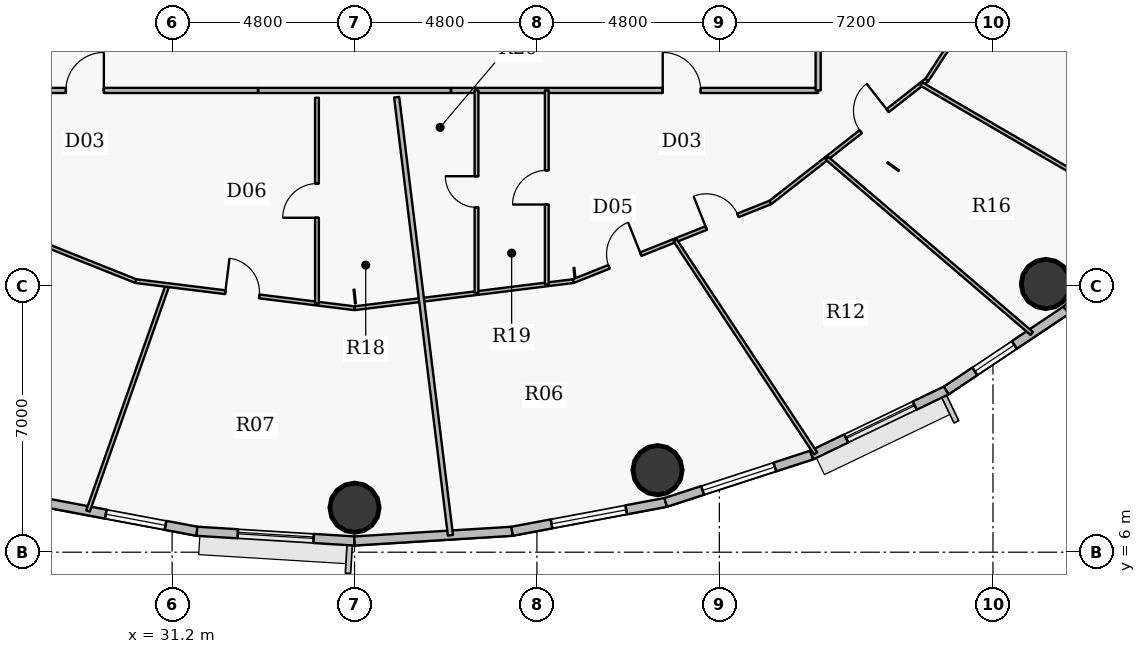
"""IFC4 building model, lengths in metres.
Left out: names, types, materials, properties, quantities, classifications, styles, units other than length and angle.
Written with IfcOpenShell. Run it as: python <this file> out.ifc"""

import sys

from ifc_helpers import new_model, si_unit, direction, frame, frame_2d, origin, origin_2d, place, context, subcontext, project, spatial, rectangle, hollow_circle, extrude, source, transform, mapped, element, fill, save


model = new_model("IFC4")
c1 = context("Model", 3, precision=1e-05, world=origin(), true_north=direction((0.0, 1.0)))
c2 = subcontext(c1, "Body", "Model", "MODEL_VIEW")
j1 = project(units=[si_unit("LENGTHUNIT", "METRE"), si_unit("PLANEANGLEUNIT", "RADIAN")], contexts=[c1])
p1 = place(None, origin())
s1 = spatial("IfcSite", under=j1, at=p1, CompositionType="ELEMENT")
p2 = place(p1, origin())
s2 = spatial("IfcBuilding", under=s1, at=p2, CompositionType="ELEMENT")
p3 = place(p2, frame((0.0, 0.0, 171.15)))
s3 = spatial("IfcBuildingStorey", under=s2, at=p3, CompositionType="ELEMENT", Elevation=171.15)
for number, where, z_axis, x_axis in (
    (1, (36.0, 7.17, 0.0), (0.0, 0.0, 1.0), (1.0, 0.0, 0.0)),
    (2, (43.973, 8.159, 0.0), (0.0, 0.0, 1.0), (1.0, 0.0, 0.0)),
    (3, (54.192, 13.058, 0.0), (0.0, 0.0, 1.0), (1.0, 0.0, 0.0)),
):
    element("IfcColumn", number, at=place(p3, frame(where, z_axis=z_axis, x_axis=x_axis)), inside=s3, PredefinedType="COLUMN", context=c2, shape_type="SweptSolid", body=[
        extrude(hollow_circle(Radius=0.65, WallThickness=0.04, at=origin_2d()), origin(), (0.0, 0.0, 1.0), 3.75),
    ])
p4 = place(p3, frame((31.854, 6.551, 0.0), z_axis=(0.0, 0.0, 1.0), x_axis=(-0.982788108205, 0.184736391573, 0.0)))
e4 = element("IfcWall", 4, at=p4, inside=s3, PredefinedType="SOLIDWALL", context=c2, shape_type="SweptSolid", body=[
    extrude(rectangle(XDim=4.114, YDim=0.24, at=frame_2d((2.057, 0.0))), origin(), (0.0, 0.0, 1.0), 3.5),
])
p5 = place(p4, frame((0.842, 0.0, 0.9)))
e5 = element("IfcOpeningElement", 5, at=p5, cuts=e4, PredefinedType="OPENING", context=c2, shape_type="SweptSolid", body=[
    extrude(rectangle(XDim=1.6, YDim=1.75, at=origin_2d()), frame((0.8, 0.13, 0.875), z_axis=(0.0, -1.0, 0.0), x_axis=(1.0, 0.0, 0.0)), (0.0, 0.0, 1.0), 0.26),
])
p6 = place(p3, frame((36.0, 6.295, 0.0), z_axis=(0.0, 0.0, 1.0), x_axis=(-0.998104600619, 0.061540281305, 0.0)))
e6 = element("IfcWall", 6, at=p6, inside=s3, PredefinedType="SOLIDWALL", context=c2, shape_type="SweptSolid", body=[
    extrude(rectangle(XDim=4.154, YDim=0.24, at=frame_2d((2.077, 0.0))), origin(), (0.0, 0.0, 1.0), 3.5),
])
p7 = place(p6, frame((1.077, 0.0, 0.9)))
e7 = element("IfcOpeningElement", 7, at=p7, cuts=e6, PredefinedType="OPENING", context=c2, shape_type="SweptSolid", body=[
    extrude(rectangle(XDim=2.0, YDim=1.75, at=origin_2d()), frame((1.0, 0.13, 0.875), z_axis=(0.0, -1.0, 0.0), x_axis=(1.0, 0.0, 0.0)), (0.0, 0.0, 1.0), 0.26),
])
p8 = place(p3, frame((40.146, 6.551, 0.0), z_axis=(0.0, 0.0, 1.0), x_axis=(-0.998104600619, -0.061540281305, 0.0)))
e8 = element("IfcWall", 8, at=p8, inside=s3, PredefinedType="SOLIDWALL", context=c2, shape_type="SweptSolid", body=[
    extrude(rectangle(XDim=4.154, YDim=0.24, at=frame_2d((2.077, 0.0))), origin(), (0.0, 0.0, 1.0), 3.5),
])
p9 = place(p3, frame((44.189, 7.311, 0.0), z_axis=(0.0, 0.0, 1.0), x_axis=(-0.982788108205, -0.184736391573, 0.0)))
e9 = element("IfcWall", 9, at=p9, inside=s3, PredefinedType="SOLIDWALL", context=c2, shape_type="SweptSolid", body=[
    extrude(rectangle(XDim=4.114, YDim=0.24, at=frame_2d((2.057, 0.0))), origin(), (0.0, 0.0, 1.0), 3.5),
])
p10 = place(p9, frame((1.057, 0.0, 0.9)))
e10 = element("IfcOpeningElement", 10, at=p10, cuts=e9, PredefinedType="OPENING", context=c2, shape_type="SweptSolid", body=[
    extrude(rectangle(XDim=2.0, YDim=1.75, at=origin_2d()), frame((1.0, 0.13, 0.875), z_axis=(0.0, -1.0, 0.0), x_axis=(1.0, 0.0, 0.0)), (0.0, 0.0, 1.0), 0.26),
])
p11 = place(p3, frame((48.03, 8.556, 0.0), z_axis=(0.0, 0.0, 1.0), x_axis=(-0.951209870236, -0.30854462038, 0.0)))
e11 = element("IfcWall", 11, at=p11, inside=s3, PredefinedType="SOLIDWALL", context=c2, shape_type="SweptSolid", body=[
    extrude(rectangle(XDim=4.038, YDim=0.24, at=frame_2d((2.019, 0.0))), origin(), (0.0, 0.0, 1.0), 3.5),
])
p12 = place(p11, frame((1.019, 0.0, 0.9)))
e12 = element("IfcOpeningElement", 12, at=p12, cuts=e11, PredefinedType="OPENING", context=c2, shape_type="SweptSolid", body=[
    extrude(rectangle(XDim=2.0, YDim=1.75, at=origin_2d()), frame((1.0, 0.13, 0.875), z_axis=(0.0, -1.0, 0.0), x_axis=(1.0, 0.0, 0.0)), (0.0, 0.0, 1.0), 0.26),
])
p13 = place(p3, frame((51.573, 10.257, 0.0), z_axis=(0.0, 0.0, 1.0), x_axis=(-0.901564733809, -0.432644231155, 0.0)))
e13 = element("IfcWall", 13, at=p13, inside=s3, PredefinedType="SOLIDWALL", context=c2, shape_type="SweptSolid", body=[
    extrude(rectangle(XDim=3.93, YDim=0.24, at=frame_2d((1.965, 0.0))), origin(), (0.0, 0.0, 1.0), 3.5),
])
p14 = place(p13, frame((0.923, 0.0, 0.9)))
e14 = element("IfcOpeningElement", 14, at=p14, cuts=e13, PredefinedType="OPENING", context=c2, shape_type="SweptSolid", body=[
    extrude(rectangle(XDim=2.0, YDim=1.75, at=origin_2d()), frame((1.0, 0.13, 0.875), z_axis=(0.0, -1.0, 0.0), x_axis=(1.0, 0.0, 0.0)), (0.0, 0.0, 1.0), 0.26),
])
p15 = place(p3, frame((54.732, 12.369, 0.0), z_axis=(0.0, 0.0, 1.0), x_axis=(-0.831228998277, -0.555930168657, 0.0)))
e15 = element("IfcWall", 15, at=p15, inside=s3, PredefinedType="SOLIDWALL", context=c2, shape_type="SweptSolid", body=[
    extrude(rectangle(XDim=3.8, YDim=0.24, at=frame_2d((1.9, 0.0))), origin(), (0.0, 0.0, 1.0), 3.5),
])
p16 = place(p15, frame((1.648, 0.0, 0.9)))
e16 = element("IfcOpeningElement", 16, at=p16, cuts=e15, PredefinedType="OPENING", context=c2, shape_type="SweptSolid", body=[
    extrude(rectangle(XDim=1.25, YDim=1.65, at=origin_2d()), frame((0.625, 0.13, 0.825), z_axis=(0.0, -1.0, 0.0), x_axis=(1.0, 0.0, 0.0)), (0.0, 0.0, 1.0), 0.26),
])
p17 = place(p3, frame((57.428, 14.842, 0.0), z_axis=(0.0, 0.0, 1.0), x_axis=(-0.737076565834, -0.675809245349, 0.0)))
e17 = element("IfcWall", 17, at=p17, inside=s3, PredefinedType="SOLIDWALL", context=c2, shape_type="SweptSolid", body=[
    extrude(rectangle(XDim=3.658, YDim=0.24, at=frame_2d((1.829, 0.0))), origin(), (0.0, 0.0, 1.0), 3.5),
])
p18 = place(p3, frame((24.35, 18.15, 0.0), z_axis=(0.0, 0.0, 1.0), x_axis=(1.0, 0.0, 0.0)))
e18 = element("IfcWall", 18, at=p18, inside=s3, PredefinedType="PARTITIONING", context=c2, shape_type="SweptSolid", body=[
    extrude(rectangle(XDim=9.109, YDim=0.135, at=frame_2d((4.554, 0.0))), origin(), (0.0, 0.0, 1.0), 2.935),
])
p19 = place(p18, frame((4.054, 0.0, 0.0)))
e19 = element("IfcOpeningElement", 19, at=p19, cuts=e18, PredefinedType="OPENING", context=c2, shape_type="SweptSolid", body=[
    extrude(rectangle(XDim=1.0, YDim=2.15, at=origin_2d()), frame((0.5, 0.078, 1.075), z_axis=(0.0, -1.0, 0.0), x_axis=(1.0, 0.0, 0.0)), (0.0, 0.0, 1.0), 0.155),
])
p20 = place(p3, frame((25.055, 15.204, 0.0), z_axis=(0.0, 0.0, 1.0), x_axis=(0.928798710424, -0.370584613166, 0.0)))
e20 = element("IfcWall", 20, at=p20, inside=s3, PredefinedType="PARTITIONING", context=c2, shape_type="SweptSolid", body=[
    extrude(rectangle(XDim=5.589, YDim=0.1, at=frame_2d((2.794, 0.0))), origin(), (0.0, 0.0, 1.0), 2.935),
])
p21 = place(p3, frame((28.987, 7.084, 0.0), z_axis=(0.0, 0.0, 1.0), x_axis=(0.332161523942, 0.943222519882, 0.0)))
e21 = element("IfcWall", 21, at=p21, inside=s3, PredefinedType="PARTITIONING", context=c2, shape_type="SweptSolid", body=[
    extrude(rectangle(XDim=6.303, YDim=0.1, at=frame_2d((3.151, 0.0))), origin(), (0.0, 0.0, 1.0), 2.935),
])
p22 = place(p3, frame((30.246, 13.133, 0.0), z_axis=(0.0, 0.0, 1.0), x_axis=(0.992396615981, -0.123081097612, 0.0)))
e22 = element("IfcWall", 22, at=p22, inside=s3, PredefinedType="PARTITIONING", context=c2, shape_type="SweptSolid", body=[
    extrude(rectangle(XDim=5.798, YDim=0.1, at=frame_2d((2.899, 0.0))), origin(), (0.0, 0.0, 1.0), 2.935),
])
p23 = place(p22, frame((2.371, 0.0, 0.0)))
e23 = element("IfcOpeningElement", 23, at=p23, cuts=e22, PredefinedType="OPENING", context=c2, shape_type="SweptSolid", body=[
    extrude(rectangle(XDim=0.9, YDim=2.1, at=origin_2d()), frame((0.45, 0.06, 1.05), z_axis=(0.0, -1.0, 0.0), x_axis=(1.0, 0.0, 0.0)), (0.0, 0.0, 1.0), 0.12),
])
p24 = place(p3, frame((35.012, 12.542, 0.0), z_axis=(0.0, 0.0, 1.0), x_axis=(0.0, 1.0, 0.0)))
e24 = element("IfcWall", 24, at=p24, inside=s3, PredefinedType="PARTITIONING", context=c2, shape_type="SweptSolid", body=[
    extrude(rectangle(XDim=5.416, YDim=0.1, at=frame_2d((2.708, 0.0))), origin(), (0.0, 0.0, 1.0), 3.5),
])
p25 = place(p24, frame((2.258, 0.0, 0.0)))
e25 = element("IfcOpeningElement", 25, at=p25, cuts=e24, PredefinedType="OPENING", context=c2, shape_type="SweptSolid", body=[
    extrude(rectangle(XDim=0.9, YDim=2.1, at=origin_2d()), frame((0.45, 0.06, 1.05), z_axis=(0.0, -1.0, 0.0), x_axis=(1.0, 0.0, 0.0)), (0.0, 0.0, 1.0), 0.12),
])
p26 = place(p3, frame((36.0, 12.419, 0.0), z_axis=(0.0, 0.0, 1.0), x_axis=(0.992396615981, 0.123081097612, 0.0)))
e26 = element("IfcWall", 26, at=p26, inside=s3, PredefinedType="PARTITIONING", context=c2, shape_type="SweptSolid", body=[
    extrude(rectangle(XDim=5.798, YDim=0.1, at=frame_2d((2.899, 0.0))), origin(), (0.0, 0.0, 1.0), 2.935),
])
p27 = place(p3, frame((37.108, 17.972, 0.0), z_axis=(0.0, 0.0, 1.0), x_axis=(0.121868774407, -0.992546221505, 0.0)))
e27 = element("IfcWall", 27, at=p27, inside=s3, PredefinedType="PARTITIONING", context=c2, shape_type="SweptSolid", body=[
    extrude(rectangle(XDim=11.613, YDim=0.135, at=frame_2d((5.807, 0.0))), origin(), (0.0, 0.0, 1.0), 2.935),
])
p28 = place(p3, frame((38.541, 18.15, 0.0), z_axis=(0.0, 0.0, 1.0), x_axis=(1.0, 0.0, 0.0)))
e28 = element("IfcWall", 28, at=p28, inside=s3, PredefinedType="PARTITIONING", context=c2, shape_type="SweptSolid", body=[
    extrude(rectangle(XDim=9.659, YDim=0.135, at=frame_2d((4.829, 0.0))), origin(), (0.0, 0.0, 1.0), 2.935),
])
p29 = place(p28, frame((5.568, 0.0, 0.0)))
e29 = element("IfcOpeningElement", 29, at=p29, cuts=e28, PredefinedType="OPENING", context=c2, shape_type="SweptSolid", body=[
    extrude(rectangle(XDim=1.0, YDim=2.15, at=origin_2d()), frame((0.5, 0.078, 1.075), z_axis=(0.0, -1.0, 0.0), x_axis=(1.0, 0.0, 0.0)), (0.0, 0.0, 1.0), 0.155),
])
p30 = place(p3, frame((39.21, 12.817, 0.0), z_axis=(0.0, 0.0, 1.0), x_axis=(0.0, 1.0, 0.0)))
e30 = element("IfcWall", 30, at=p30, inside=s3, PredefinedType="PARTITIONING", context=c2, shape_type="SweptSolid", body=[
    extrude(rectangle(XDim=5.333, YDim=0.1, at=frame_2d((2.667, 0.0))), origin(), (0.0, 0.0, 1.0), 2.985),
])
p31 = place(p30, frame((2.256, 0.0, 0.0)))
e31 = element("IfcOpeningElement", 31, at=p31, cuts=e30, PredefinedType="OPENING", context=c2, shape_type="SweptSolid", body=[
    extrude(rectangle(XDim=0.82, YDim=2.1, at=origin_2d()), frame((0.41, 0.06, 1.05), z_axis=(0.0, -1.0, 0.0), x_axis=(1.0, 0.0, 0.0)), (0.0, 0.0, 1.0), 0.12),
])
p32 = place(p3, frame((41.059, 13.046, 0.0), z_axis=(0.0, 0.0, 1.0), x_axis=(0.0, 1.0, 0.0)))
e32 = element("IfcWall", 32, at=p32, inside=s3, PredefinedType="PARTITIONING", context=c2, shape_type="SweptSolid", body=[
    extrude(rectangle(XDim=5.104, YDim=0.1, at=frame_2d((2.552, 0.0))), origin(), (0.0, 0.0, 1.0), 2.935),
])
p33 = place(p32, frame((2.102, 0.0, 0.0)))
e33 = element("IfcOpeningElement", 33, at=p33, cuts=e32, PredefinedType="OPENING", context=c2, shape_type="SweptSolid", body=[
    extrude(rectangle(XDim=0.9, YDim=2.1, at=origin_2d()), frame((0.45, 0.06, 1.05), z_axis=(0.0, -1.0, 0.0), x_axis=(1.0, 0.0, 0.0)), (0.0, 0.0, 1.0), 0.12),
])
p34 = place(p3, frame((41.754, 13.133, 0.0), z_axis=(0.0, 0.0, 1.0), x_axis=(0.928798710424, 0.370584613166, 0.0)))
e34 = element("IfcWall", 34, at=p34, inside=s3, PredefinedType="PARTITIONING", context=c2, shape_type="SweptSolid", body=[
    extrude(rectangle(XDim=5.589, YDim=0.1, at=frame_2d((2.794, 0.0))), origin(), (0.0, 0.0, 1.0), 2.935),
])
p35 = place(p34, frame((1.015, 0.0, 0.0)))
e35 = element("IfcOpeningElement", 35, at=p35, cuts=e34, PredefinedType="OPENING", context=c2, shape_type="SweptSolid", body=[
    extrude(rectangle(XDim=0.9, YDim=2.1, at=origin_2d()), frame((0.45, 0.06, 1.05), z_axis=(0.0, -1.0, 0.0), x_axis=(1.0, 0.0, 0.0)), (0.0, 0.0, 1.0), 0.12),
])
p36 = place(p34, frame((3.769, 0.0, 0.0)))
e36 = element("IfcOpeningElement", 36, at=p36, cuts=e34, PredefinedType="OPENING", context=c2, shape_type="SweptSolid", body=[
    extrude(rectangle(XDim=0.9, YDim=2.1, at=origin_2d()), frame((0.45, 0.06, 1.05), z_axis=(0.0, -1.0, 0.0), x_axis=(1.0, 0.0, 0.0)), (0.0, 0.0, 1.0), 0.12),
])
p37 = place(p3, frame((44.438, 14.204, 0.0), z_axis=(0.0, 0.0, 1.0), x_axis=(0.550479331571, -0.834848792006, 0.0)))
e37 = element("IfcWall", 37, at=p37, inside=s3, PredefinedType="PARTITIONING", context=c2, shape_type="SweptSolid", body=[
    extrude(rectangle(XDim=6.712, YDim=0.1, at=frame_2d((3.356, 0.0))), origin(), (0.0, 0.0, 1.0), 2.935),
])
p38 = place(p3, frame((46.945, 15.204, 0.0), z_axis=(0.0, 0.0, 1.0), x_axis=(0.787300155222, 0.616569919463, 0.0)))
e38 = element("IfcWall", 38, at=p38, inside=s3, PredefinedType="PARTITIONING", context=c2, shape_type="SweptSolid", body=[
    extrude(rectangle(XDim=5.232, YDim=0.1, at=frame_2d((2.616, 0.0))), origin(), (0.0, 0.0, 1.0), 2.935),
])
p39 = place(p38, frame((3.018, 0.0, 0.0)))
e39 = element("IfcOpeningElement", 39, at=p39, cuts=e38, PredefinedType="OPENING", context=c2, shape_type="SweptSolid", body=[
    extrude(rectangle(XDim=0.9, YDim=2.1, at=origin_2d()), frame((0.45, 0.06, 1.05), z_axis=(0.0, -1.0, 0.0), x_axis=(1.0, 0.0, 0.0)), (0.0, 0.0, 1.0), 0.12),
])
p40 = place(p3, frame((48.2, 18.15, 0.0), z_axis=(0.0, 0.0, 1.0), x_axis=(0.0, 1.0, 0.0)))
e40 = element("IfcWall", 40, at=p40, inside=s3, PredefinedType="PARTITIONING", context=c2, shape_type="SweptSolid", body=[
    extrude(rectangle(XDim=1.9, YDim=0.135, at=frame_2d((0.95, 0.0))), origin(), (0.0, 0.0, 1.0), 3.5),
])
p41 = place(p3, frame((48.43, 16.367, 0.0), z_axis=(0.0, 0.0, 1.0), x_axis=(0.759902290403, -0.650037313575, 0.0)))
e41 = element("IfcWall", 41, at=p41, inside=s3, PredefinedType="PARTITIONING", context=c2, shape_type="SweptSolid", body=[
    extrude(rectangle(XDim=7.095, YDim=0.1, at=frame_2d((3.548, 0.0))), origin(), (0.0, 0.0, 1.0), 2.935),
])
p42 = place(p3, frame((50.92, 18.317, 0.0), z_axis=(0.0, 0.0, 1.0), x_axis=(0.864271351568, -0.50302587494, 0.0)))
e42 = element("IfcWall", 42, at=p42, inside=s3, PredefinedType="PARTITIONING", context=c2, shape_type="SweptSolid", body=[
    extrude(rectangle(XDim=7.294, YDim=0.1, at=frame_2d((3.647, 0.0))), origin(), (0.0, 0.0, 1.0), 2.935),
])
p43 = place(p3, frame((51.064, 18.429, 0.0), z_axis=(0.0, 0.0, 1.0), x_axis=(0.545379401359, 0.838189303542, 0.0)))
e43 = element("IfcWall", 43, at=p43, inside=s3, PredefinedType="PARTITIONING", context=c2, shape_type="SweptSolid", body=[
    extrude(rectangle(XDim=4.805, YDim=0.1, at=frame_2d((2.403, 0.0))), origin(), (0.0, 0.0, 1.0), 2.935),
])
p44 = place(p43, frame((1.953, 0.0, 0.0)))
e44 = element("IfcOpeningElement", 44, at=p44, cuts=e43, PredefinedType="OPENING", context=c2, shape_type="SweptSolid", body=[
    extrude(rectangle(XDim=0.9, YDim=2.1, at=origin_2d()), frame((0.45, 0.06, 1.05), z_axis=(0.0, -1.0, 0.0), x_axis=(1.0, 0.0, 0.0)), (0.0, 0.0, 1.0), 0.12),
])
p45 = place(p3, frame((38.531, 18.15, 0.0), z_axis=(0.0, 0.0, 1.0), x_axis=(-1.0, 0.0, 0.0)))
e45 = element("IfcWall", 45, at=p45, inside=s3, PredefinedType="PARTITIONING", context=c2, shape_type="SweptSolid", body=[
    extrude(rectangle(XDim=5.062, YDim=0.135, at=frame_2d((2.531, 0.0))), origin(), (0.0, 0.0, 1.0), 2.935),
])
m1 = source(origin(), c2, "Body", "SweptSolid", [
    extrude(rectangle(XDim=1.6, YDim=1.75, at=origin_2d()), frame((0.8, 0.03, 0.875), z_axis=(0.0, -1.0, 0.0), x_axis=(1.0, 0.0, 0.0)), (0.0, 0.0, 1.0), 0.06),
])
p46 = place(p5, origin())
e46 = element("IfcWindow", 46, at=p46, inside=s3, PartitioningType="DOUBLE_PANEL_VERTICAL", PredefinedType="WINDOW", context=c2, shape_type="MappedRepresentation", body=[
    mapped(m1, transform((0.0, 0.0, 0.0), x_axis=(1.0, 0.0, 0.0), y_axis=(0.0, 1.0, 0.0), z_axis=(0.0, 0.0, 1.0), scale=1.0)),
])
fill(e5, e46)
m2 = source(origin(), c2, "Body", "SweptSolid", [
    extrude(rectangle(XDim=2.0, YDim=1.75, at=origin_2d()), frame((1.0, 0.03, 0.875), z_axis=(0.0, -1.0, 0.0), x_axis=(1.0, 0.0, 0.0)), (0.0, 0.0, 1.0), 0.06),
])
p47 = place(p7, origin())
e47 = element("IfcWindow", 47, at=p47, inside=s3, PartitioningType="DOUBLE_PANEL_VERTICAL", PredefinedType="WINDOW", context=c2, shape_type="MappedRepresentation", body=[
    mapped(m2, transform((0.0, 0.0, 0.0), x_axis=(1.0, 0.0, 0.0), y_axis=(0.0, 1.0, 0.0), z_axis=(0.0, 0.0, 1.0), scale=1.0)),
])
fill(e7, e47)
p48 = place(p10, origin())
e48 = element("IfcWindow", 48, at=p48, inside=s3, PartitioningType="DOUBLE_PANEL_VERTICAL", PredefinedType="WINDOW", context=c2, shape_type="MappedRepresentation", body=[
    mapped(m2, transform((0.0, 0.0, 0.0), x_axis=(1.0, 0.0, 0.0), y_axis=(0.0, 1.0, 0.0), z_axis=(0.0, 0.0, 1.0), scale=1.0)),
])
fill(e10, e48)
p49 = place(p12, origin())
e49 = element("IfcWindow", 49, at=p49, inside=s3, PartitioningType="DOUBLE_PANEL_VERTICAL", PredefinedType="WINDOW", context=c2, shape_type="MappedRepresentation", body=[
    mapped(m2, transform((0.0, 0.0, 0.0), x_axis=(1.0, 0.0, 0.0), y_axis=(0.0, 1.0, 0.0), z_axis=(0.0, 0.0, 1.0), scale=1.0)),
])
fill(e12, e49)
p50 = place(p14, origin())
e50 = element("IfcWindow", 50, at=p50, inside=s3, PartitioningType="DOUBLE_PANEL_VERTICAL", PredefinedType="WINDOW", context=c2, shape_type="MappedRepresentation", body=[
    mapped(m2, transform((0.0, 0.0, 0.0), x_axis=(1.0, 0.0, 0.0), y_axis=(0.0, 1.0, 0.0), z_axis=(0.0, 0.0, 1.0), scale=1.0)),
])
fill(e14, e50)
m3 = source(origin(), c2, "Body", "SweptSolid", [
    extrude(rectangle(XDim=1.25, YDim=1.65, at=origin_2d()), frame((0.625, 0.03, 0.825), z_axis=(0.0, -1.0, 0.0), x_axis=(1.0, 0.0, 0.0)), (0.0, 0.0, 1.0), 0.06),
])
p51 = place(p16, origin())
e51 = element("IfcWindow", 51, at=p51, inside=s3, PartitioningType="SINGLE_PANEL", PredefinedType="WINDOW", context=c2, shape_type="MappedRepresentation", body=[
    mapped(m3, transform((0.0, 0.0, 0.0), x_axis=(1.0, 0.0, 0.0), y_axis=(0.0, 1.0, 0.0), z_axis=(0.0, 0.0, 1.0), scale=1.0)),
])
fill(e16, e51)
m4 = source(origin(), c2, "Body", "SweptSolid", [
    extrude(rectangle(XDim=1.0, YDim=2.15, at=origin_2d()), frame((0.5, 0.025, 1.075), z_axis=(0.0, -1.0, 0.0), x_axis=(1.0, 0.0, 0.0)), (0.0, 0.0, 1.0), 0.05),
])
p52 = place(p19, origin())
e52 = element("IfcDoor", 52, at=p52, inside=s3, OperationType="SINGLE_SWING_RIGHT", PredefinedType="DOOR", context=c2, shape_type="MappedRepresentation", body=[
    mapped(m4, transform((0.0, 0.0, 0.0), x_axis=(1.0, 0.0, 0.0), y_axis=(0.0, 1.0, 0.0), z_axis=(0.0, 0.0, 1.0), scale=1.0)),
])
fill(e19, e52)
m5 = source(origin(), c2, "Body", "SweptSolid", [
    extrude(rectangle(XDim=0.9, YDim=2.1, at=origin_2d()), frame((0.45, 0.025, 1.05), z_axis=(0.0, -1.0, 0.0), x_axis=(1.0, 0.0, 0.0)), (0.0, 0.0, 1.0), 0.05),
])
p53 = place(p23, origin())
e53 = element("IfcDoor", 53, at=p53, inside=s3, OperationType="SINGLE_SWING_LEFT", PredefinedType="DOOR", context=c2, shape_type="MappedRepresentation", body=[
    mapped(m5, transform((0.0, 0.0, 0.0), x_axis=(1.0, 0.0, 0.0), y_axis=(0.0, 1.0, 0.0), z_axis=(0.0, 0.0, 1.0), scale=1.0)),
])
fill(e23, e53)
p54 = place(p25, origin())
e54 = element("IfcDoor", 54, at=p54, inside=s3, OperationType="SINGLE_SWING_LEFT", PredefinedType="DOOR", context=c2, shape_type="MappedRepresentation", body=[
    mapped(m5, transform((0.0, 0.0, 0.0), x_axis=(1.0, 0.0, 0.0), y_axis=(0.0, 1.0, 0.0), z_axis=(0.0, 0.0, 1.0), scale=1.0)),
])
fill(e25, e54)
p55 = place(p29, origin())
e55 = element("IfcDoor", 55, at=p55, inside=s3, OperationType="SINGLE_SWING_LEFT", PredefinedType="DOOR", context=c2, shape_type="MappedRepresentation", body=[
    mapped(m4, transform((0.0, 0.0, 0.0), x_axis=(1.0, 0.0, 0.0), y_axis=(0.0, 1.0, 0.0), z_axis=(0.0, 0.0, 1.0), scale=1.0)),
])
fill(e29, e55)
p56 = place(p35, origin())
e56 = element("IfcDoor", 56, at=p56, inside=s3, OperationType="SINGLE_SWING_RIGHT", PredefinedType="DOOR", context=c2, shape_type="MappedRepresentation", body=[
    mapped(m5, transform((0.0, 0.0, 0.0), x_axis=(1.0, 0.0, 0.0), y_axis=(0.0, 1.0, 0.0), z_axis=(0.0, 0.0, 1.0), scale=1.0)),
])
fill(e35, e56)
p57 = place(p36, origin())
e57 = element("IfcDoor", 57, at=p57, inside=s3, OperationType="SINGLE_SWING_LEFT", PredefinedType="DOOR", context=c2, shape_type="MappedRepresentation", body=[
    mapped(m5, transform((0.0, 0.0, 0.0), x_axis=(1.0, 0.0, 0.0), y_axis=(0.0, 1.0, 0.0), z_axis=(0.0, 0.0, 1.0), scale=1.0)),
])
fill(e36, e57)
p58 = place(p39, origin())
e58 = element("IfcDoor", 58, at=p58, inside=s3, OperationType="SINGLE_SWING_RIGHT", PredefinedType="DOOR", context=c2, shape_type="MappedRepresentation", body=[
    mapped(m5, transform((0.0, 0.0, 0.0), x_axis=(1.0, 0.0, 0.0), y_axis=(0.0, 1.0, 0.0), z_axis=(0.0, 0.0, 1.0), scale=1.0)),
])
fill(e39, e58)
p59 = place(p33, origin())
e59 = element("IfcDoor", 59, at=p59, inside=s3, OperationType="SINGLE_SWING_LEFT", PredefinedType="DOOR", context=c2, shape_type="MappedRepresentation", body=[
    mapped(m5, transform((0.0, 0.0, 0.0), x_axis=(1.0, 0.0, 0.0), y_axis=(0.0, 1.0, 0.0), z_axis=(0.0, 0.0, 1.0), scale=1.0)),
])
fill(e33, e59)
m6 = source(origin(), c2, "Body", "SweptSolid", [
    extrude(rectangle(XDim=0.82, YDim=2.1, at=origin_2d()), frame((0.41, 0.025, 1.05), z_axis=(0.0, -1.0, 0.0), x_axis=(1.0, 0.0, 0.0)), (0.0, 0.0, 1.0), 0.05),
])
p60 = place(p31, origin())
e60 = element("IfcDoor", 60, at=p60, inside=s3, OperationType="SINGLE_SWING_RIGHT", PredefinedType="DOOR", context=c2, shape_type="MappedRepresentation", body=[
    mapped(m6, transform((0.0, 0.0, 0.0), x_axis=(1.0, 0.0, 0.0), y_axis=(0.0, 1.0, 0.0), z_axis=(0.0, 0.0, 1.0), scale=1.0)),
])
fill(e31, e60)
save(model, sys.argv[1])
